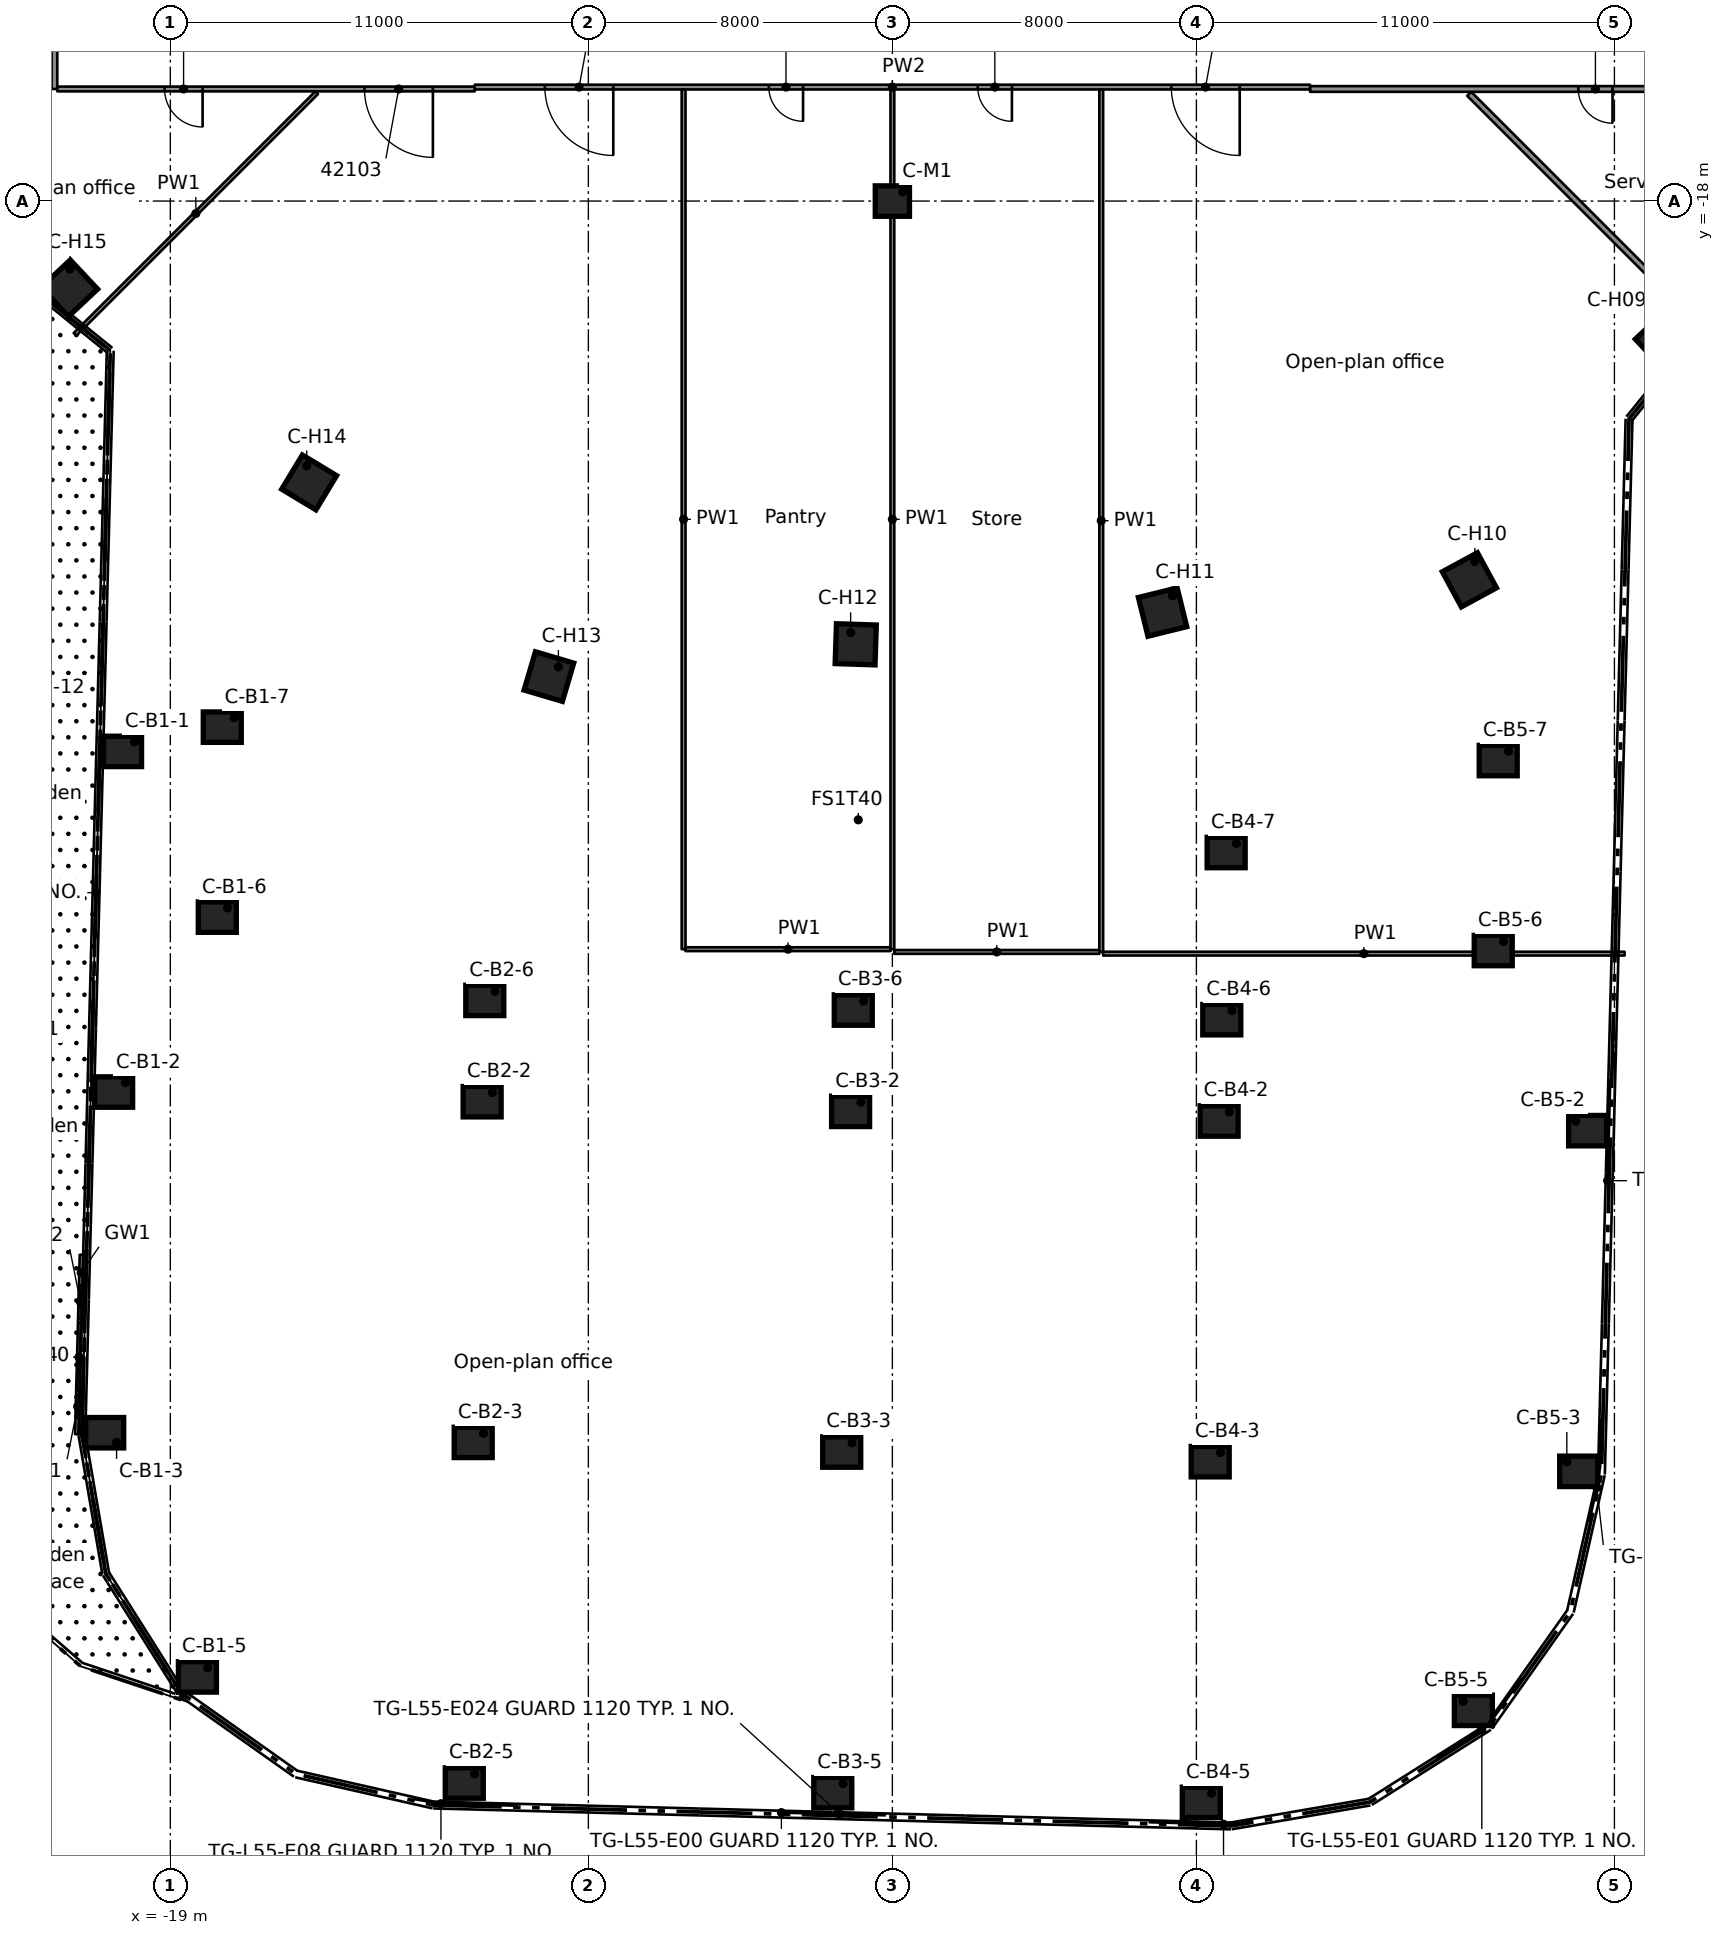
"""IFC4 building model, lengths in metres.
Left out: names, types, materials, properties, quantities, classifications, styles, units other than length and angle.
Written with IfcOpenShell. Run it as: python <this file> out.ifc"""

import sys

from ifc_helpers import new_model, si_unit, direction, frame, frame_2d, origin, origin_2d, place, context, subcontext, project, spatial, rectangle, extrude, element, fill, save


model = new_model("IFC4")
c1 = context("Model", 3, precision=1e-05, world=origin(), true_north=direction((0.0, 1.0)))
c2 = subcontext(c1, "Body", "Model", "MODEL_VIEW")
j1 = project(units=[si_unit("LENGTHUNIT", "METRE"), si_unit("PLANEANGLEUNIT", "RADIAN")], contexts=[c1])
p1 = place(None, origin())
s1 = spatial("IfcSite", under=j1, at=p1, CompositionType="ELEMENT")
p2 = place(p1, origin())
s2 = spatial("IfcBuilding", under=s1, at=p2, CompositionType="ELEMENT")
p3 = place(p2, frame((0.0, 0.0, 210.5)))
s3 = spatial("IfcBuildingStorey", under=s2, at=p3, CompositionType="ELEMENT", Elevation=210.5)
for number, where, z_axis, x_axis in (
    (1, (-20.257, -32.481, 0.0), (0.0, 0.0, 1.0), (1.0, 0.0, 0.0)),
    (2, (-20.492, -41.444, 0.0), (0.0, 0.0, 1.0), (1.0, 0.0, 0.0)),
    (3, (-20.727, -50.408, 0.0), (0.0, 0.0, 1.0), (1.0, 0.0, 0.0)),
    (4, (-18.287, -56.834, 0.0), (0.0, 0.0, 1.0), (1.0, 0.0, 0.0)),
    (5, (-17.764, -36.841, 0.0), (0.0, 0.0, 1.0), (1.0, 0.0, 0.0)),
    (6, (-17.633, -31.843, 0.0), (0.0, 0.0, 1.0), (1.0, 0.0, 0.0)),
    (7, (-10.795, -41.698, 0.0), (0.0, 0.0, 1.0), (1.0, 0.0, 0.0)),
    (8, (-11.03, -50.662, 0.0), (0.0, 0.0, 1.0), (1.0, 0.0, 0.0)),
    (9, (-11.265, -59.626, 0.0), (0.0, 0.0, 1.0), (1.0, 0.0, 0.0)),
    (10, (-10.725, -39.033, 0.0), (0.0, 0.0, 1.0), (1.0, 0.0, 0.0)),
    (11, (-1.099, -41.952, 0.0), (0.0, 0.0, 1.0), (1.0, 0.0, 0.0)),
    (12, (-1.333, -50.916, 0.0), (0.0, 0.0, 1.0), (1.0, 0.0, 0.0)),
    (13, (-1.568, -59.879, 0.0), (0.0, 0.0, 1.0), (1.0, 0.0, 0.0)),
    (14, (-1.029, -39.287, 0.0), (0.0, 0.0, 1.0), (1.0, 0.0, 0.0)),
    (15, (8.598, -42.206, 0.0), (0.0, 0.0, 1.0), (1.0, 0.0, 0.0)),
    (16, (8.363, -51.17, 0.0), (0.0, 0.0, 1.0), (1.0, 0.0, 0.0)),
    (17, (8.129, -60.133, 0.0), (0.0, 0.0, 1.0), (1.0, 0.0, 0.0)),
    (18, (8.668, -39.54, 0.0), (0.0, 0.0, 1.0), (1.0, 0.0, 0.0)),
    (19, (8.783, -35.142, 0.0), (0.0, 0.0, 1.0), (1.0, 0.0, 0.0)),
    (20, (18.295, -42.46, 0.0), (0.0, 0.0, 1.0), (1.0, 0.0, 0.0)),
    (21, (18.06, -51.424, 0.0), (0.0, 0.0, 1.0), (1.0, 0.0, 0.0)),
    (22, (15.288, -57.713, 0.0), (0.0, 0.0, 1.0), (1.0, 0.0, 0.0)),
    (23, (15.811, -37.72, 0.0), (0.0, 0.0, 1.0), (1.0, 0.0, 0.0)),
    (24, (15.942, -32.722, 0.0), (0.0, 0.0, 1.0), (1.0, 0.0, 0.0)),
):
    element("IfcColumn", number, at=place(p3, frame(where, z_axis=z_axis, x_axis=x_axis)), inside=s3, PredefinedType="COLUMN", context=c2, shape_type="SweptSolid", body=[
        extrude(rectangle(XDim=1.0, YDim=0.8, at=origin_2d()), origin(), (0.0, 0.0, 1.0), 3.5),
    ])
for number, where, z_axis, x_axis in (
    (25, (20.293, -21.657, 0.0), (0.0, 0.0, 1.0), (0.684, -0.73, 0.0)),
    (26, (15.184, -27.966, 0.0), (0.0, 0.0, 1.0), (0.477, -0.879, 0.0)),
    (27, (7.11, -28.815, 0.0), (0.0, 0.0, 1.0), (0.24, -0.971, 0.0)),
    (28, (-0.964, -29.663, 0.0), (0.0, 0.0, 1.0), (-0.032, -0.999, 0.0)),
    (29, (-9.038, -30.512, 0.0), (0.0, 0.0, 1.0), (-0.284, -0.959, 0.0)),
    (30, (-15.347, -25.403, 0.0), (0.0, 0.0, 1.0), (-0.517, -0.856, 0.0)),
    (31, (-21.657, -20.293, 0.0), (0.0, 0.0, 1.0), (-0.73, -0.684, 0.0)),
):
    element("IfcColumn", number, at=place(p3, frame(where, z_axis=z_axis, x_axis=x_axis)), inside=s3, PredefinedType="COLUMN", context=c2, shape_type="SweptSolid", body=[
        extrude(rectangle(XDim=1.05, YDim=1.05, at=origin_2d()), origin(), (0.0, 0.0, 1.0), 3.5),
    ])
p4 = place(p3, frame((0.0, -18.0, 0.0), z_axis=(0.0, 0.0, 1.0), x_axis=(1.0, 0.0, 0.0)))
e32 = element("IfcColumn", 32, at=p4, inside=s3, PredefinedType="COLUMN", context=c2, shape_type="SweptSolid", body=[
    extrude(rectangle(XDim=0.9, YDim=0.8, at=origin_2d()), origin(), (0.0, 0.0, 1.0), 3.5),
])
p5 = place(p3, frame((-21.458, -50.447, 0.0), z_axis=(0.0, 0.0, 1.0), x_axis=(0.026165257671, 0.999657631037, 0.0)))
e33 = element("IfcWall", 33, at=p5, inside=s3, PredefinedType="STANDARD", context=c2, shape_type="SweptSolid", body=[
    extrude(rectangle(XDim=4.721, YDim=0.1, at=frame_2d((2.361, 0.0))), origin(), (0.0, 0.0, 1.0), 3.1),
])
p6 = place(p5, frame((1.129, 0.0, 0.0)))
e34 = element("IfcOpeningElement", 34, at=p6, cuts=e33, PredefinedType="OPENING", context=c2, shape_type="SweptSolid", body=[
    extrude(rectangle(XDim=1.8, YDim=2.4, at=frame_2d((0.9, 1.2))), frame((0.0, 0.06, 0.0), z_axis=(0.0, -1.0, 0.0), x_axis=(1.0, 0.0, 0.0)), (0.0, 0.0, 1.0), 0.12),
])
p7 = place(p5, frame((0.429, 0.0, 0.0)))
e35 = element("IfcOpeningElement", 35, at=p7, cuts=e33, PredefinedType="OPENING", context=c2, shape_type="SweptSolid", body=[
    extrude(rectangle(XDim=0.6, YDim=2.4, at=frame_2d((0.3, 1.2))), frame((0.0, 0.06, 0.0), z_axis=(0.0, -1.0, 0.0), x_axis=(1.0, 0.0, 0.0)), (0.0, 0.0, 1.0), 0.12),
])
p8 = place(p5, frame((3.029, 0.0, 0.0)))
e36 = element("IfcOpeningElement", 36, at=p8, cuts=e33, PredefinedType="OPENING", context=c2, shape_type="SweptSolid", body=[
    extrude(rectangle(XDim=0.9, YDim=2.4, at=frame_2d((0.45, 1.2))), frame((0.0, 0.06, 0.0), z_axis=(0.0, -1.0, 0.0), x_axis=(1.0, 0.0, 0.0)), (0.0, 0.0, 1.0), 0.12),
])
p9 = place(p3, frame((15.179, -15.179, 0.0), z_axis=(0.0, 0.0, 1.0), x_axis=(0.707106781187, -0.707106781187, 0.0)))
e37 = element("IfcWall", 37, at=p9, inside=s3, PredefinedType="PARTITIONING", context=c2, shape_type="SweptSolid", body=[
    extrude(rectangle(XDim=8.949, YDim=0.15, at=frame_2d((4.475, 0.0))), origin(), (0.0, 0.0, 1.0), 3.08),
])
p10 = place(p3, frame((5.546, -37.802, 0.0), z_axis=(0.0, 0.0, 1.0), x_axis=(1.0, 0.0, 0.0)))
e38 = element("IfcWall", 38, at=p10, inside=s3, PredefinedType="PARTITIONING", context=c2, shape_type="SweptSolid", body=[
    extrude(rectangle(XDim=13.721, YDim=0.1, at=frame_2d((6.861, 0.0))), origin(), (0.0, 0.0, 1.0), 3.08),
])
p11 = place(p3, frame((0.05, -37.757, 0.0), z_axis=(0.0, 0.0, 1.0), x_axis=(1.0, 0.0, 0.0)))
e39 = element("IfcWall", 39, at=p11, inside=s3, PredefinedType="PARTITIONING", context=c2, shape_type="SweptSolid", body=[
    extrude(rectangle(XDim=5.396, YDim=0.1, at=frame_2d((2.698, 0.0))), origin(), (0.0, 0.0, 1.0), 3.08),
])
p12 = place(p3, frame((-5.444, -37.685, 0.0), z_axis=(0.0, 0.0, 1.0), x_axis=(1.0, 0.0, 0.0)))
e40 = element("IfcWall", 40, at=p12, inside=s3, PredefinedType="PARTITIONING", context=c2, shape_type="SweptSolid", body=[
    extrude(rectangle(XDim=5.394, YDim=0.1, at=frame_2d((2.697, 0.0))), origin(), (0.0, 0.0, 1.0), 3.08),
])
p13 = place(p3, frame((-10.991, -15.051, 0.0), z_axis=(0.0, 0.0, 1.0), x_axis=(-1.0, 0.0, 0.0)))
e41 = element("IfcWall", 41, at=p13, inside=s3, PredefinedType="PARTITIONING", context=c2, shape_type="SweptSolid", body=[
    extrude(rectangle(XDim=10.984, YDim=0.125, at=frame_2d((5.492, 0.0))), origin(), (0.0, 0.0, 1.0), 3.08),
])
p14 = place(p13, frame((7.16, 0.0, 0.0)))
e42 = element("IfcOpeningElement", 42, at=p14, cuts=e41, PredefinedType="OPENING", context=c2, shape_type="SweptSolid", body=[
    extrude(rectangle(XDim=1.0, YDim=2.1, at=frame_2d((0.5, 1.05))), frame((0.0, 0.073, 0.0), z_axis=(0.0, -1.0, 0.0), x_axis=(1.0, 0.0, 0.0)), (0.0, 0.0, 1.0), 0.145),
])
p15 = place(p13, frame((1.1, 0.0, 0.0)))
e43 = element("IfcOpeningElement", 43, at=p15, cuts=e41, PredefinedType="OPENING", context=c2, shape_type="SweptSolid", body=[
    extrude(rectangle(XDim=1.8, YDim=2.1, at=frame_2d((0.9, 1.05))), frame((0.0, 0.073, 0.0), z_axis=(0.0, -1.0, 0.0), x_axis=(1.0, 0.0, 0.0)), (0.0, 0.0, 1.0), 0.145),
])
p16 = place(p3, frame((21.975, -15.051, 0.0), z_axis=(0.0, 0.0, 1.0), x_axis=(-1.0, 0.0, 0.0)))
e44 = element("IfcWall", 44, at=p16, inside=s3, PredefinedType="PARTITIONING", context=c2, shape_type="SweptSolid", body=[
    extrude(rectangle(XDim=10.984, YDim=0.15, at=frame_2d((5.492, 0.0))), origin(), (0.0, 0.0, 1.0), 3.08),
])
p17 = place(p16, frame((3.025, 0.0, 0.0)))
e45 = element("IfcOpeningElement", 45, at=p17, cuts=e44, PredefinedType="OPENING", context=c2, shape_type="SweptSolid", body=[
    extrude(rectangle(XDim=0.9, YDim=2.1, at=frame_2d((0.45, 1.05))), frame((0.0, 0.085, 0.0), z_axis=(0.0, -1.0, 0.0), x_axis=(1.0, 0.0, 0.0)), (0.0, 0.0, 1.0), 0.17),
])
p18 = place(p3, frame((10.99, -15.001, 0.0), z_axis=(0.0, 0.0, 1.0), x_axis=(-1.0, 0.0, 0.0)))
e46 = element("IfcWall", 46, at=p18, inside=s3, PredefinedType="PARTITIONING", context=c2, shape_type="SweptSolid", body=[
    extrude(rectangle(XDim=21.98, YDim=0.125, at=frame_2d((10.99, 0.0))), origin(), (0.0, 0.0, 1.0), 3.08),
])
p19 = place(p18, frame((18.334, 0.0, 0.0)))
e47 = element("IfcOpeningElement", 47, at=p19, cuts=e46, PredefinedType="OPENING", context=c2, shape_type="SweptSolid", body=[
    extrude(rectangle(XDim=1.8, YDim=2.1, at=frame_2d((0.9, 1.05))), frame((0.0, 0.073, 0.0), z_axis=(0.0, -1.0, 0.0), x_axis=(1.0, 0.0, 0.0)), (0.0, 0.0, 1.0), 0.145),
])
p20 = place(p18, frame((13.34, 0.0, 0.0)))
e48 = element("IfcOpeningElement", 48, at=p20, cuts=e46, PredefinedType="OPENING", context=c2, shape_type="SweptSolid", body=[
    extrude(rectangle(XDim=0.9, YDim=2.1, at=frame_2d((0.45, 1.05))), frame((0.0, 0.073, 0.0), z_axis=(0.0, -1.0, 0.0), x_axis=(1.0, 0.0, 0.0)), (0.0, 0.0, 1.0), 0.145),
])
p21 = place(p18, frame((7.844, 0.0, 0.0)))
e49 = element("IfcOpeningElement", 49, at=p21, cuts=e46, PredefinedType="OPENING", context=c2, shape_type="SweptSolid", body=[
    extrude(rectangle(XDim=0.9, YDim=2.1, at=frame_2d((0.45, 1.05))), frame((0.0, 0.073, 0.0), z_axis=(0.0, -1.0, 0.0), x_axis=(1.0, 0.0, 0.0)), (0.0, 0.0, 1.0), 0.145),
])
p22 = place(p18, frame((1.85, 0.0, 0.0)))
e50 = element("IfcOpeningElement", 50, at=p22, cuts=e46, PredefinedType="OPENING", context=c2, shape_type="SweptSolid", body=[
    extrude(rectangle(XDim=1.8, YDim=2.1, at=frame_2d((0.9, 1.05))), frame((0.0, 0.073, 0.0), z_axis=(0.0, -1.0, 0.0), x_axis=(1.0, 0.0, 0.0)), (0.0, 0.0, 1.0), 0.145),
])
p23 = place(p3, frame((-21.508, -21.508, 0.0), z_axis=(0.0, 0.0, 1.0), x_axis=(0.707106781187, 0.707106781187, 0.0)))
e51 = element("IfcWall", 51, at=p23, inside=s3, PredefinedType="PARTITIONING", context=c2, shape_type="SweptSolid", body=[
    extrude(rectangle(XDim=8.993, YDim=0.1, at=frame_2d((4.497, 0.0))), origin(), (0.0, 0.0, 1.0), 3.08),
])
p24 = place(p3, frame((5.496, -37.757, 0.0), z_axis=(0.0, 0.0, 1.0), x_axis=(0.0, 1.0, 0.0)))
e52 = element("IfcWall", 52, at=p24, inside=s3, PredefinedType="PARTITIONING", context=c2, shape_type="SweptSolid", body=[
    extrude(rectangle(XDim=22.694, YDim=0.1, at=frame_2d((11.347, 0.0))), origin(), (0.0, 0.0, 1.0), 3.08),
])
for number, where, z_axis, x_axis in (
    (53, (0.0, -37.685, 0.0), (0.0, 0.0, 1.0), (0.0, 1.0, 0.0)),
    (54, (-5.494, -37.685, 0.0), (0.0, 0.0, 1.0), (0.0, 1.0, 0.0)),
):
    element("IfcWall", number, at=place(p3, frame(where, z_axis=z_axis, x_axis=x_axis)), inside=s3, PredefinedType="PARTITIONING", context=c2, shape_type="SweptSolid", body=[
        extrude(rectangle(XDim=22.622, YDim=0.1, at=frame_2d((11.311, 0.0))), origin(), (0.0, 0.0, 1.0), 3.08),
    ])
p25 = place(p3, frame((-22.05, -15.051, 0.0), z_axis=(0.0, 0.0, 1.0), x_axis=(0.0, 1.0, 0.0)))
e55 = element("IfcWall", 55, at=p25, inside=s3, PredefinedType="PARTITIONING", context=c2, shape_type="SweptSolid", body=[
    extrude(rectangle(XDim=30.102, YDim=0.15, at=frame_2d((15.051, 0.0))), origin(), (0.0, 0.0, 1.0), 3.08),
])
p26 = place(p25, frame((8.151, 0.0, 0.0)))
e56 = element("IfcOpeningElement", 56, at=p26, cuts=e55, PredefinedType="OPENING", context=c2, shape_type="SweptSolid", body=[
    extrude(rectangle(XDim=1.8, YDim=2.1, at=frame_2d((0.9, 1.05))), frame((0.0, 0.085, 0.0), z_axis=(0.0, -1.0, 0.0), x_axis=(1.0, 0.0, 0.0)), (0.0, 0.0, 1.0), 0.17),
])
p27 = place(p25, frame((25.652, 0.0, 0.0)))
e57 = element("IfcOpeningElement", 57, at=p27, cuts=e55, PredefinedType="OPENING", context=c2, shape_type="SweptSolid", body=[
    extrude(rectangle(XDim=0.9, YDim=2.1, at=frame_2d((0.45, 1.05))), frame((0.0, 0.085, 0.0), z_axis=(0.0, -1.0, 0.0), x_axis=(1.0, 0.0, 0.0)), (0.0, 0.0, 1.0), 0.17),
])
p28 = place(p25, frame((19.402, 0.0, 0.0)))
e58 = element("IfcOpeningElement", 58, at=p28, cuts=e55, PredefinedType="OPENING", context=c2, shape_type="SweptSolid", body=[
    extrude(rectangle(XDim=1.1, YDim=2.1, at=frame_2d((0.55, 1.05))), frame((0.0, 0.085, 0.0), z_axis=(0.0, -1.0, 0.0), x_axis=(1.0, 0.0, 0.0)), (0.0, 0.0, 1.0), 0.17),
])
p29 = place(p6, origin())
e59 = element("IfcDoor", 59, at=p29, inside=s3, OperationType="DOUBLE_DOOR_SLIDING", PredefinedType="DOOR", context=c2, shape_type="SweptSolid", body=[
    extrude(rectangle(XDim=1.8, YDim=2.4, at=frame_2d((0.9, 1.2))), frame((0.0, 0.025, 0.0), z_axis=(0.0, -1.0, 0.0), x_axis=(1.0, 0.0, 0.0)), (0.0, 0.0, 1.0), 0.05),
])
fill(e34, e59)
p30 = place(p7, origin())
e60 = element("IfcWindow", 60, at=p30, inside=s3, PartitioningType="SINGLE_PANEL", PredefinedType="WINDOW", context=c2, shape_type="SweptSolid", body=[
    extrude(rectangle(XDim=0.6, YDim=2.4, at=frame_2d((0.3, 1.2))), frame((0.0, 0.03, 0.0), z_axis=(0.0, -1.0, 0.0), x_axis=(1.0, 0.0, 0.0)), (0.0, 0.0, 1.0), 0.06),
])
fill(e35, e60)
p31 = place(p8, origin())
e61 = element("IfcWindow", 61, at=p31, inside=s3, PartitioningType="SINGLE_PANEL", PredefinedType="WINDOW", context=c2, shape_type="SweptSolid", body=[
    extrude(rectangle(XDim=0.9, YDim=2.4, at=frame_2d((0.45, 1.2))), frame((0.0, 0.03, 0.0), z_axis=(0.0, -1.0, 0.0), x_axis=(1.0, 0.0, 0.0)), (0.0, 0.0, 1.0), 0.06),
])
fill(e36, e61)
p32 = place(p17, origin())
e62 = element("IfcDoor", 62, at=p32, inside=s3, OperationType="SINGLE_SWING_LEFT", PredefinedType="DOOR", context=c2, shape_type="SweptSolid", body=[
    extrude(rectangle(XDim=0.9, YDim=2.1, at=frame_2d((0.45, 1.05))), frame((0.0, 0.025, 0.0), z_axis=(0.0, -1.0, 0.0), x_axis=(1.0, 0.0, 0.0)), (0.0, 0.0, 1.0), 0.05),
])
fill(e45, e62)
p33 = place(p14, origin())
e63 = element("IfcDoor", 63, at=p33, inside=s3, OperationType="SINGLE_SWING_RIGHT", PredefinedType="DOOR", context=c2, shape_type="SweptSolid", body=[
    extrude(rectangle(XDim=1.0, YDim=2.1, at=frame_2d((0.5, 1.05))), frame((0.0, 0.025, 0.0), z_axis=(0.0, -1.0, 0.0), x_axis=(1.0, 0.0, 0.0)), (0.0, 0.0, 1.0), 0.05),
])
fill(e42, e63)
p34 = place(p15, origin())
e64 = element("IfcDoor", 64, at=p34, inside=s3, OperationType="DOUBLE_DOOR_SINGLE_SWING", PredefinedType="DOOR", context=c2, shape_type="SweptSolid", body=[
    extrude(rectangle(XDim=1.8, YDim=2.1, at=frame_2d((0.9, 1.05))), frame((0.0, 0.025, 0.0), z_axis=(0.0, -1.0, 0.0), x_axis=(1.0, 0.0, 0.0)), (0.0, 0.0, 1.0), 0.05),
])
fill(e43, e64)
p35 = place(p19, origin())
e65 = element("IfcDoor", 65, at=p35, inside=s3, OperationType="DOUBLE_DOOR_SINGLE_SWING", PredefinedType="DOOR", context=c2, shape_type="SweptSolid", body=[
    extrude(rectangle(XDim=1.8, YDim=2.1, at=frame_2d((0.9, 1.05))), frame((0.0, 0.025, 0.0), z_axis=(0.0, -1.0, 0.0), x_axis=(1.0, 0.0, 0.0)), (0.0, 0.0, 1.0), 0.05),
])
fill(e47, e65)
p36 = place(p20, origin())
e66 = element("IfcDoor", 66, at=p36, inside=s3, OperationType="SINGLE_SWING_RIGHT", PredefinedType="DOOR", context=c2, shape_type="SweptSolid", body=[
    extrude(rectangle(XDim=0.9, YDim=2.1, at=frame_2d((0.45, 1.05))), frame((0.0, 0.025, 0.0), z_axis=(0.0, -1.0, 0.0), x_axis=(1.0, 0.0, 0.0)), (0.0, 0.0, 1.0), 0.05),
])
fill(e48, e66)
p37 = place(p21, origin())
e67 = element("IfcDoor", 67, at=p37, inside=s3, OperationType="SINGLE_SWING_LEFT", PredefinedType="DOOR", context=c2, shape_type="SweptSolid", body=[
    extrude(rectangle(XDim=0.9, YDim=2.1, at=frame_2d((0.45, 1.05))), frame((0.0, 0.025, 0.0), z_axis=(0.0, -1.0, 0.0), x_axis=(1.0, 0.0, 0.0)), (0.0, 0.0, 1.0), 0.05),
])
fill(e49, e67)
p38 = place(p22, origin())
e68 = element("IfcDoor", 68, at=p38, inside=s3, OperationType="DOUBLE_DOOR_SINGLE_SWING", PredefinedType="DOOR", context=c2, shape_type="SweptSolid", body=[
    extrude(rectangle(XDim=1.8, YDim=2.1, at=frame_2d((0.9, 1.05))), frame((0.0, 0.025, 0.0), z_axis=(0.0, -1.0, 0.0), x_axis=(1.0, 0.0, 0.0)), (0.0, 0.0, 1.0), 0.05),
])
fill(e50, e68)
save(model, sys.argv[1])
